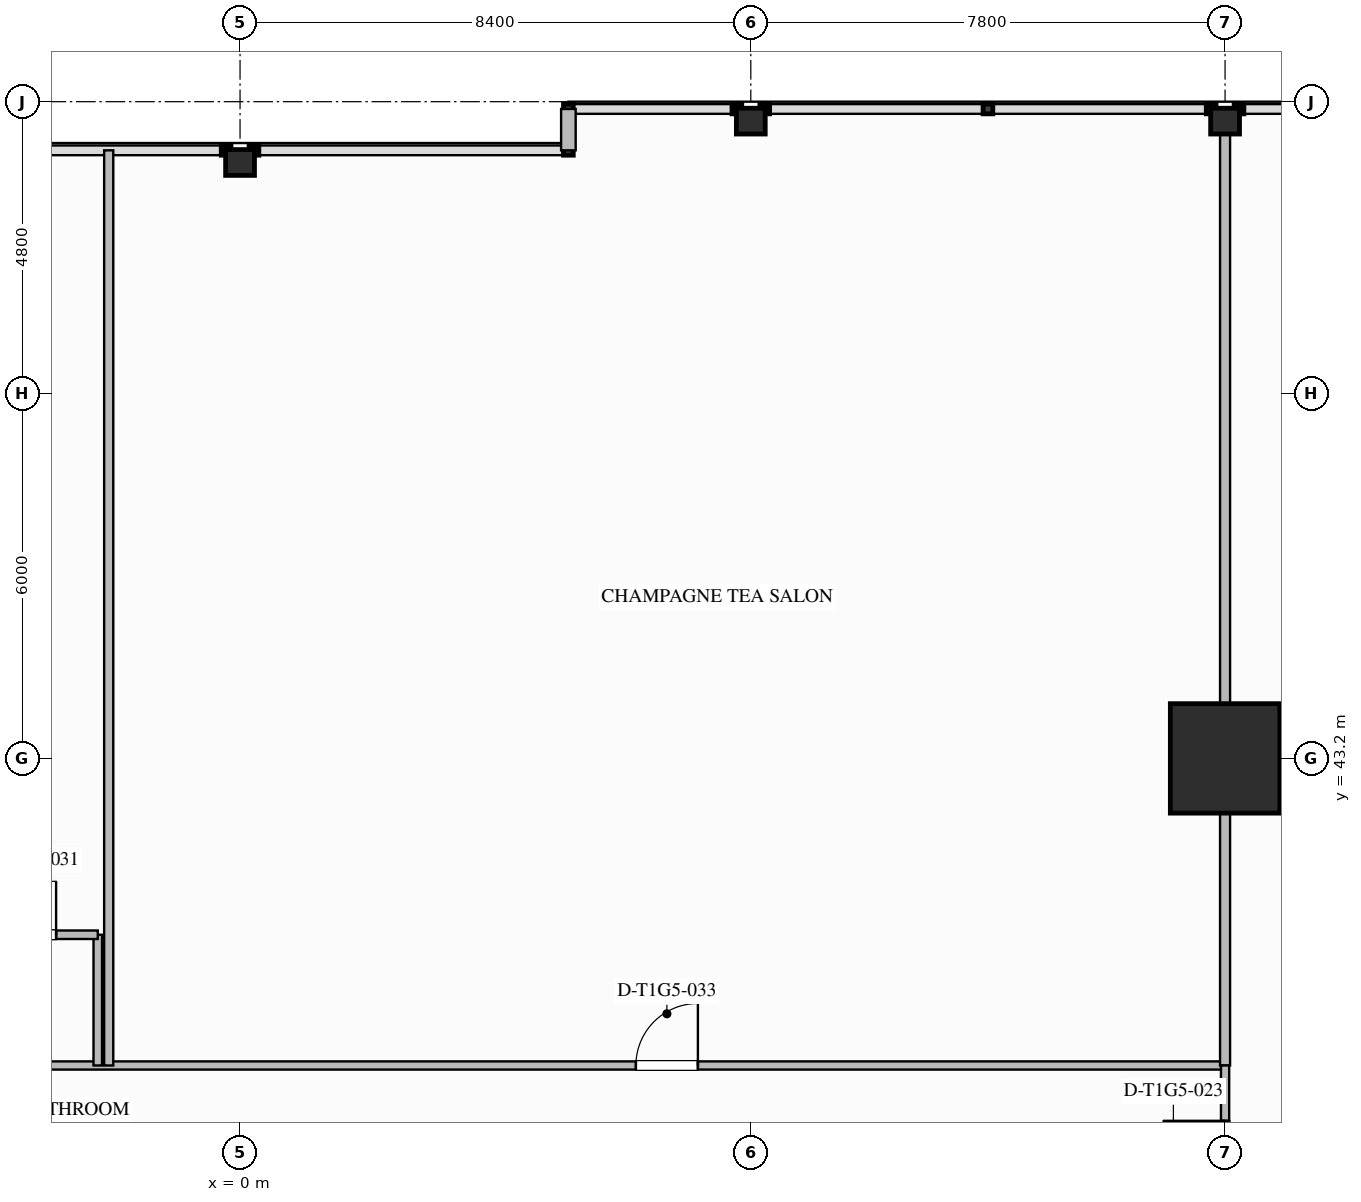
"""IFC4 building model, lengths in metres.
Left out: names, types, materials, properties, quantities, classifications, styles, units other than length and angle.
Written with IfcOpenShell. Run it as: python <this file> out.ifc"""

import sys

from ifc_helpers import new_model, si_unit, direction, frame, frame_2d, origin, origin_2d, place, context, subcontext, project, spatial, rectangle, i_section, extrude, element, fill, save


model = new_model("IFC4")
c1 = context("Model", 3, precision=1e-05, world=origin(), true_north=direction((0.0, 1.0)))
c2 = subcontext(c1, "Body", "Model", "MODEL_VIEW")
j1 = project(units=[si_unit("LENGTHUNIT", "METRE"), si_unit("PLANEANGLEUNIT", "RADIAN")], contexts=[c1])
p1 = place(None, origin())
s1 = spatial("IfcSite", under=j1, at=p1, CompositionType="ELEMENT")
p2 = place(p1, origin())
s2 = spatial("IfcBuilding", under=s1, at=p2, CompositionType="ELEMENT")
p3 = place(p2, frame((0.0, 0.0, 75.2)))
s3 = spatial("IfcBuildingStorey", under=s2, at=p3, CompositionType="ELEMENT", Elevation=75.2)
p4 = place(p3, frame((16.2, 43.2, 0.0), z_axis=(0.0, 0.0, 1.0), x_axis=(1.0, 0.0, 0.0)))
e1 = element("IfcColumn", 1, at=p4, inside=s3, PredefinedType="COLUMN", context=c2, shape_type="SweptSolid", body=[
    extrude(rectangle(XDim=1.8, YDim=1.8, at=origin_2d()), origin(), (0.0, 0.0, 1.0), 3.5),
])
for number, where, z_axis, x_axis in (
    (2, (0.0, 53.0, 0.0), (0.0, 0.0, 1.0), (0.0, 1.0, 0.0)),
    (3, (8.4, 53.68, 0.0), (0.0, 0.0, 1.0), (0.0, 1.0, 0.0)),
    (4, (16.2, 53.68, 0.0), (0.0, 0.0, 1.0), (0.0, 1.0, 0.0)),
):
    element("IfcColumn", number, at=place(p3, frame(where, z_axis=z_axis, x_axis=x_axis)), inside=s3, PredefinedType="COLUMN", context=c2, shape_type="SweptSolid", body=[
        extrude(i_section(OverallWidth=0.424, OverallDepth=0.474, WebThickness=0.048, FlangeThickness=0.077, FilletRadius=0.03, at=origin_2d()), origin(), (0.0, 0.0, 1.0), 3.497),
    ])
p5 = place(p3, frame((5.4, 53.2, 0.0), z_axis=(0.0, 0.0, 1.0), x_axis=(0.0, 1.0, 0.0)))
e5 = element("IfcWall", 5, at=p5, inside=s3, PredefinedType="STANDARD", context=c2, shape_type="SweptSolid", body=[
    extrude(rectangle(XDim=0.68, YDim=0.24, at=frame_2d((0.34, 0.0))), origin(), (0.0, 0.0, 1.0), 3.24),
])
p6 = place(p3, frame((-16.2, 38.15, 0.0), z_axis=(0.0, 0.0, 1.0), x_axis=(1.0, 0.0, 0.0)))
e6 = element("IfcWall", 6, at=p6, inside=s3, PredefinedType="PARTITIONING", context=c2, shape_type="SweptSolid", body=[
    extrude(rectangle(XDim=32.4, YDim=0.135, at=frame_2d((16.2, 0.0))), origin(), (0.0, 0.0, 1.0), 3.24),
])
p7 = place(p6, frame((5.175, 0.0, 0.0)))
e7 = element("IfcOpeningElement", 7, at=p7, cuts=e6, PredefinedType="OPENING", context=c2, shape_type="SweptSolid", body=[
    extrude(rectangle(XDim=1.26, YDim=2.2, at=frame_2d((0.63, 1.1))), frame((0.0, 0.077, 0.0), z_axis=(0.0, -1.0, 0.0), x_axis=(1.0, 0.0, 0.0)), (0.0, 0.0, 1.0), 0.155),
])
p8 = place(p6, frame((22.71, 0.0, 0.0)))
e8 = element("IfcOpeningElement", 8, at=p8, cuts=e6, PredefinedType="OPENING", context=c2, shape_type="SweptSolid", body=[
    extrude(rectangle(XDim=1.02, YDim=2.15, at=frame_2d((0.51, 1.075))), frame((0.0, 0.077, 0.0), z_axis=(0.0, -1.0, 0.0), x_axis=(1.0, 0.0, 0.0)), (0.0, 0.0, 1.0), 0.155),
])
p9 = place(p3, frame((16.2, 38.15, 0.0), z_axis=(0.0, 0.0, 1.0), x_axis=(0.0, 1.0, 0.0)))
e9 = element("IfcWall", 9, at=p9, inside=s3, PredefinedType="PARTITIONING", context=c2, shape_type="SweptSolid", body=[
    extrude(rectangle(XDim=15.73, YDim=0.165, at=frame_2d((7.865, 0.0))), origin(), (0.0, 0.0, 1.0), 2.452),
])
p10 = place(p3, frame((16.2, 35.7, 0.0), z_axis=(0.0, 0.0, 1.0), x_axis=(0.0, 1.0, 0.0)))
e10 = element("IfcWall", 10, at=p10, inside=s3, PredefinedType="PARTITIONING", context=c2, shape_type="SweptSolid", body=[
    extrude(rectangle(XDim=2.45, YDim=0.135, at=frame_2d((1.225, 0.0))), origin(), (0.0, 0.0, 1.0), 2.452),
])
p11 = place(p10, frame((0.52, 0.0, 0.0)))
e11 = element("IfcOpeningElement", 11, at=p11, cuts=e10, PredefinedType="OPENING", context=c2, shape_type="SweptSolid", body=[
    extrude(rectangle(XDim=1.02, YDim=2.15, at=frame_2d((0.51, 1.075))), frame((0.0, 0.077, 0.0), z_axis=(0.0, -1.0, 0.0), x_axis=(1.0, 0.0, 0.0)), (0.0, 0.0, 1.0), 0.155),
])
p12 = place(p3, frame((-2.34, 38.15, 0.0), z_axis=(0.0, 0.0, 1.0), x_axis=(0.0, 1.0, 0.0)))
e12 = element("IfcWall", 12, at=p12, inside=s3, PredefinedType="PLUMBINGWALL", context=c2, shape_type="SweptSolid", body=[
    extrude(rectangle(XDim=2.15, YDim=0.14, at=frame_2d((1.075, 0.0))), origin(), (0.0, 0.0, 1.0), 3.24),
])
p13 = place(p3, frame((-4.59, 40.3, 0.0), z_axis=(0.0, 0.0, 1.0), x_axis=(1.0, 0.0, 0.0)))
e13 = element("IfcWall", 13, at=p13, inside=s3, PredefinedType="PLUMBINGWALL", context=c2, shape_type="SweptSolid", body=[
    extrude(rectangle(XDim=2.25, YDim=0.14, at=frame_2d((1.125, 0.0))), origin(), (0.0, 0.0, 1.0), 3.24),
])
p14 = place(p13, frame((0.685, 0.0, 0.0)))
e14 = element("IfcOpeningElement", 14, at=p14, cuts=e13, PredefinedType="OPENING", context=c2, shape_type="SweptSolid", body=[
    extrude(rectangle(XDim=0.88, YDim=2.1, at=frame_2d((0.44, 1.05))), frame((0.0, 0.08, 0.0), z_axis=(0.0, -1.0, 0.0), x_axis=(1.0, 0.0, 0.0)), (0.0, 0.0, 1.0), 0.16),
])
p15 = place(p3, frame((-2.16, 38.15, 0.0), z_axis=(0.0, 0.0, 1.0), x_axis=(0.0, 1.0, 0.0)))
e15 = element("IfcWall", 15, at=p15, inside=s3, PredefinedType="PARTITIONING", context=c2, shape_type="SweptSolid", body=[
    extrude(rectangle(XDim=15.05, YDim=0.15, at=frame_2d((7.525, 0.0))), origin(), (0.0, 0.0, 1.0), 3.24),
])
p16 = place(p11, origin())
e16 = element("IfcDoor", 16, at=p16, inside=s3, OperationType="SINGLE_SWING_RIGHT", PredefinedType="DOOR", context=c2, shape_type="SweptSolid", body=[
    extrude(rectangle(XDim=1.02, YDim=2.15, at=frame_2d((0.51, 1.075))), frame((0.0, 0.025, 0.0), z_axis=(0.0, -1.0, 0.0), x_axis=(1.0, 0.0, 0.0)), (0.0, 0.0, 1.0), 0.05),
])
fill(e11, e16)
p17 = place(p14, origin())
e17 = element("IfcDoor", 17, at=p17, inside=s3, OperationType="SINGLE_SWING_RIGHT", PredefinedType="DOOR", context=c2, shape_type="SweptSolid", body=[
    extrude(rectangle(XDim=0.88, YDim=2.1, at=frame_2d((0.44, 1.05))), frame((0.0, 0.025, 0.0), z_axis=(0.0, -1.0, 0.0), x_axis=(1.0, 0.0, 0.0)), (0.0, 0.0, 1.0), 0.05),
])
fill(e14, e17)
p18 = place(p8, origin())
e18 = element("IfcDoor", 18, at=p18, inside=s3, OperationType="SINGLE_SWING_RIGHT", PredefinedType="DOOR", context=c2, shape_type="SweptSolid", body=[
    extrude(rectangle(XDim=1.02, YDim=2.15, at=frame_2d((0.51, 1.075))), frame((0.0, 0.025, 0.0), z_axis=(0.0, -1.0, 0.0), x_axis=(1.0, 0.0, 0.0)), (0.0, 0.0, 1.0), 0.05),
])
fill(e8, e18)
save(model, sys.argv[1])
